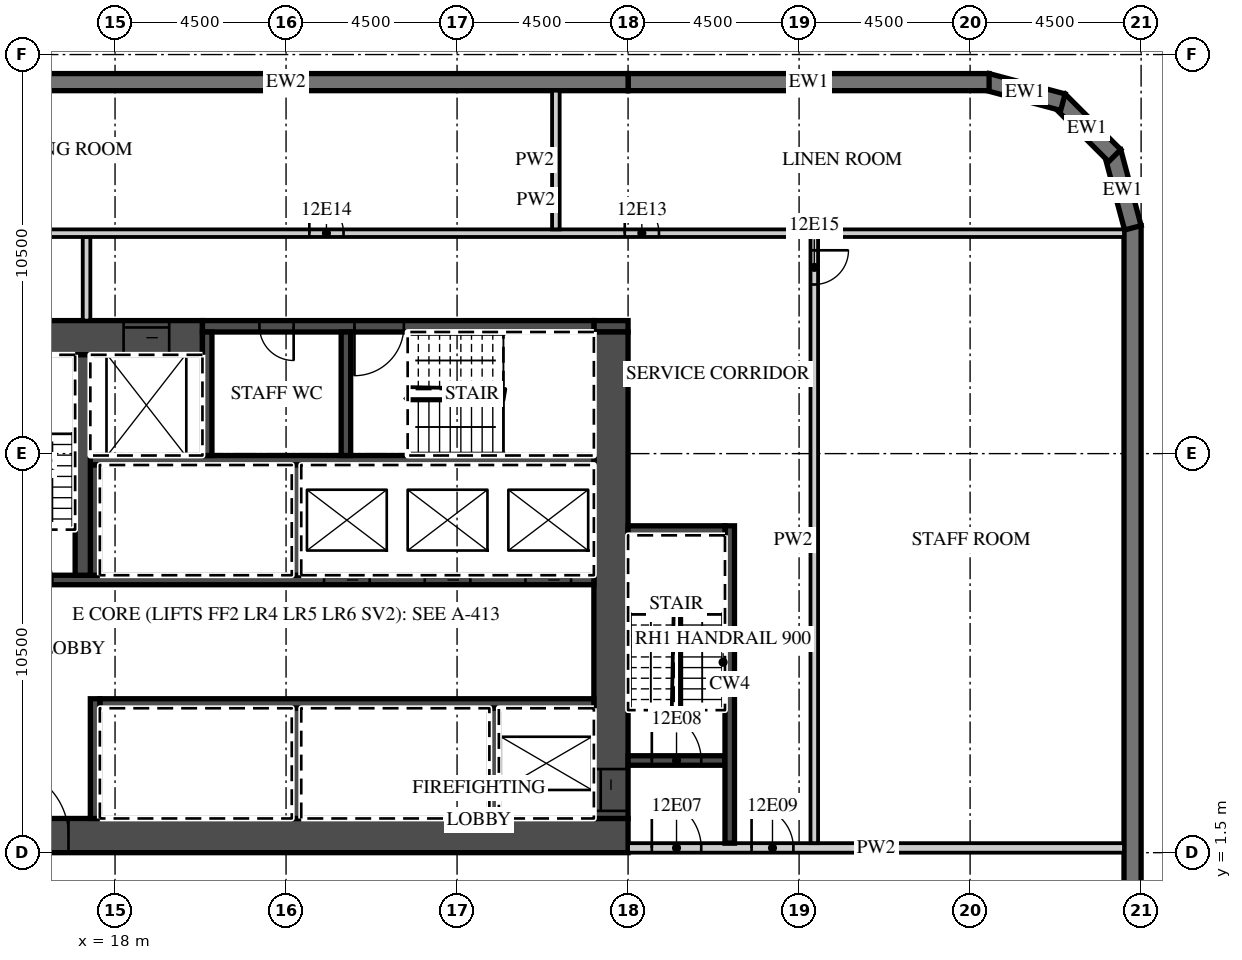
"""IFC4 building model, lengths in metres.
Left out: names, types, materials, properties, quantities, classifications, styles, units other than length and angle.
Written with IfcOpenShell. Run it as: python <this file> out.ifc"""

import sys

from ifc_helpers import new_model, si_unit, direction, frame, frame_2d, origin, place, context, subcontext, project, spatial, polyline, rectangle, outline, extrude, element, fill, save


model = new_model("IFC4")
c1 = context("Model", 3, precision=1e-05, world=origin(), true_north=direction((0.0, 1.0)))
c2 = subcontext(c1, "Body", "Model", "MODEL_VIEW")
j1 = project(units=[si_unit("LENGTHUNIT", "METRE"), si_unit("PLANEANGLEUNIT", "RADIAN")], contexts=[c1])
p1 = place(None, origin())
s1 = spatial("IfcSite", under=j1, at=p1, CompositionType="ELEMENT")
p2 = place(p1, origin())
s2 = spatial("IfcBuilding", under=s1, at=p2, CompositionType="ELEMENT")
p3 = place(p2, frame((0.0, 0.0, 69.9)))
s3 = spatial("IfcBuildingStorey", under=s2, at=p3, CompositionType="ELEMENT", Elevation=69.9)
p4 = place(p3, frame((44.775, -18.0, 0.0), z_axis=(0.0, 0.0, 1.0), x_axis=(0.0, 1.0, 0.0)))
e1 = element("IfcWall", 1, at=p4, inside=s3, PredefinedType="SOLIDWALL", context=c2, shape_type="SweptSolid", body=[
    extrude(rectangle(XDim=36.0, YDim=0.45, at=frame_2d((18.0, 0.0))), origin(), (0.0, 0.0, 1.0), 3.02),
])
p5 = place(p4, frame((3.9, 0.0, 0.45)))
e2 = element("IfcOpeningElement", 2, at=p5, cuts=e1, PredefinedType="OPENING", context=c2, shape_type="SweptSolid", body=[
    extrude(rectangle(XDim=3.3, YDim=2.25, at=frame_2d((1.65, 1.125))), frame((0.0, 0.235, 0.0), z_axis=(0.0, -1.0, 0.0), x_axis=(1.0, 0.0, 0.0)), (0.0, 0.0, 1.0), 0.47),
])
p6 = place(p4, frame((8.4, 0.0, 0.45)))
e3 = element("IfcOpeningElement", 3, at=p6, cuts=e1, PredefinedType="OPENING", context=c2, shape_type="SweptSolid", body=[
    extrude(rectangle(XDim=3.3, YDim=2.25, at=frame_2d((1.65, 1.125))), frame((0.0, 0.235, 0.0), z_axis=(0.0, -1.0, 0.0), x_axis=(1.0, 0.0, 0.0)), (0.0, 0.0, 1.0), 0.47),
])
p7 = place(p4, frame((12.9, 0.0, 0.45)))
e4 = element("IfcOpeningElement", 4, at=p7, cuts=e1, PredefinedType="OPENING", context=c2, shape_type="SweptSolid", body=[
    extrude(rectangle(XDim=3.3, YDim=2.25, at=frame_2d((1.65, 1.125))), frame((0.0, 0.235, 0.0), z_axis=(0.0, -1.0, 0.0), x_axis=(1.0, 0.0, 0.0)), (0.0, 0.0, 1.0), 0.47),
])
p8 = place(p3, frame((44.783, 17.942, 0.0), z_axis=(0.0, 0.0, 1.0), x_axis=(-0.25881466832, 0.965926999034, 0.0)))
e5 = element("IfcWall", 5, at=p8, inside=s3, PredefinedType="SOLIDWALL", context=c2, shape_type="SweptSolid", body=[
    extrude(outline(polyline([(0.0, -0.225), (2.071, -0.225), (1.95, 0.225), (0.121, 0.225), (0.0, -0.225)])), origin(), (0.0, 0.0, 1.0), 3.02),
])
p9 = place(p3, frame((44.305, 19.841, 0.0), z_axis=(0.0, 0.0, 1.0), x_axis=(-0.707106781187, 0.707106781187, 0.0)))
e6 = element("IfcWall", 6, at=p9, inside=s3, PredefinedType="SOLIDWALL", context=c2, shape_type="SweptSolid", body=[
    extrude(outline(polyline([(0.0, -0.225), (2.071, -0.225), (1.95, 0.225), (0.121, 0.225), (0.0, -0.225)])), origin(), (0.0, 0.0, 1.0), 3.02),
])
p10 = place(p3, frame((42.942, 21.247, 0.0), z_axis=(0.0, 0.0, 1.0), x_axis=(-0.965926999034, 0.25881466832, 0.0)))
e7 = element("IfcWall", 7, at=p10, inside=s3, PredefinedType="SOLIDWALL", context=c2, shape_type="SweptSolid", body=[
    extrude(outline(polyline([(-0.0, -0.225), (2.07, -0.225), (1.95, 0.225), (0.12, 0.225), (-0.0, -0.225)])), origin(), (0.0, 0.0, 1.0), 3.02),
])
p11 = place(p3, frame((41.0, 21.775, 0.0), z_axis=(0.0, 0.0, 1.0), x_axis=(-1.0, 0.0, 0.0)))
e8 = element("IfcWall", 8, at=p11, inside=s3, PredefinedType="SOLIDWALL", context=c2, shape_type="SweptSolid", body=[
    extrude(rectangle(XDim=9.5, YDim=0.45, at=frame_2d((4.75, 0.0))), origin(), (0.0, 0.0, 1.0), 3.02),
])
p12 = place(p3, frame((31.5, 21.775, 0.0), z_axis=(0.0, 0.0, 1.0), x_axis=(-1.0, 0.0, 0.0)))
e9 = element("IfcWall", 9, at=p12, inside=s3, PredefinedType="SOLIDWALL", context=c2, shape_type="SweptSolid", body=[
    extrude(rectangle(XDim=18.0, YDim=0.45, at=frame_2d((9.0, 0.0))), origin(), (0.0, 0.0, 1.0), 3.02),
])
p13 = place(p3, frame((13.5, 1.95, 0.0), z_axis=(0.0, 0.0, 1.0), x_axis=(1.0, 0.0, 0.0)))
e10 = element("IfcWall", 10, at=p13, inside=s3, PredefinedType="SHEAR", context=c2, shape_type="SweptSolid", body=[
    extrude(rectangle(XDim=18.0, YDim=0.9, at=frame_2d((9.0, 0.0))), origin(), (0.0, 0.0, 1.0), 3.02),
])
p14 = place(p13, frame((1.475, 0.0, 0.0)))
e11 = element("IfcOpeningElement", 11, at=p14, cuts=e10, PredefinedType="OPENING", context=c2, shape_type="SweptSolid", body=[
    extrude(rectangle(XDim=1.8, YDim=2.1, at=frame_2d((0.9, 1.05))), frame((0.0, 0.46, 0.0), z_axis=(0.0, -1.0, 0.0), x_axis=(1.0, 0.0, 0.0)), (0.0, 0.0, 1.0), 0.92),
])
p15 = place(p3, frame((13.5, 15.05, 0.0), z_axis=(0.0, 0.0, 1.0), x_axis=(1.0, 0.0, 0.0)))
e12 = element("IfcWall", 12, at=p15, inside=s3, PredefinedType="SHEAR", context=c2, shape_type="SweptSolid", body=[
    extrude(rectangle(XDim=6.8, YDim=0.9, at=frame_2d((3.4, 0.0))), origin(), (0.0, 0.0, 1.0), 3.02),
])
p16 = place(p15, frame((4.725, 0.0, 0.0)))
e13 = element("IfcOpeningElement", 13, at=p16, cuts=e12, PredefinedType="OPENING", context=c2, shape_type="SweptSolid", body=[
    extrude(rectangle(XDim=1.2, YDim=2.1, at=frame_2d((0.6, 1.05))), frame((0.0, 0.46, 0.0), z_axis=(0.0, -1.0, 0.0), x_axis=(1.0, 0.0, 0.0)), (0.0, 0.0, 1.0), 0.92),
])
p17 = place(p3, frame((30.6, 15.35, 0.0), z_axis=(0.0, 0.0, 1.0), x_axis=(1.0, 0.0, 0.0)))
e14 = element("IfcWall", 14, at=p17, inside=s3, PredefinedType="SHEAR", context=c2, shape_type="SweptSolid", body=[
    extrude(rectangle(XDim=0.9, YDim=0.3, at=frame_2d((0.45, 0.0))), origin(), (0.0, 0.0, 1.0), 3.02),
])
p18 = place(p3, frame((20.3, 15.35, 0.0), z_axis=(0.0, 0.0, 1.0), x_axis=(1.0, 0.0, 0.0)))
e15 = element("IfcWall", 15, at=p18, inside=s3, PredefinedType="SHEAR", context=c2, shape_type="SweptSolid", body=[
    extrude(rectangle(XDim=10.3, YDim=0.3, at=frame_2d((5.15, 0.0))), origin(), (0.0, 0.0, 1.0), 3.02),
])
p19 = place(p18, frame((4.0, 0.0, 0.0)))
e16 = element("IfcOpeningElement", 16, at=p19, cuts=e15, PredefinedType="OPENING", context=c2, shape_type="SweptSolid", body=[
    extrude(rectangle(XDim=1.3, YDim=2.1, at=frame_2d((0.65, 1.05))), frame((0.0, 0.16, 0.0), z_axis=(0.0, -1.0, 0.0), x_axis=(1.0, 0.0, 0.0)), (0.0, 0.0, 1.0), 0.32),
])
p20 = place(p18, frame((1.5, 0.0, 0.0)))
e17 = element("IfcOpeningElement", 17, at=p20, cuts=e15, PredefinedType="OPENING", context=c2, shape_type="SweptSolid", body=[
    extrude(rectangle(XDim=0.9, YDim=2.1, at=frame_2d((0.45, 1.05))), frame((0.0, 0.16, 0.0), z_axis=(0.0, -1.0, 0.0), x_axis=(1.0, 0.0, 0.0)), (0.0, 0.0, 1.0), 0.32),
])
p21 = place(p3, frame((31.05, 2.4, 0.0), z_axis=(0.0, 0.0, 1.0), x_axis=(0.0, 1.0, 0.0)))
e18 = element("IfcWall", 18, at=p21, inside=s3, PredefinedType="SHEAR", context=c2, shape_type="SweptSolid", body=[
    extrude(rectangle(XDim=12.8, YDim=0.9, at=frame_2d((6.4, 0.0))), origin(), (0.0, 0.0, 1.0), 3.02),
])
p22 = place(p21, frame((0.2, 0.0, 0.0)))
e19 = element("IfcOpeningElement", 19, at=p22, cuts=e18, PredefinedType="OPENING", context=c2, shape_type="SweptSolid", body=[
    extrude(rectangle(XDim=1.1, YDim=2.1, at=frame_2d((0.55, 1.05))), frame((0.0, 0.46, 0.0), z_axis=(0.0, -1.0, 0.0), x_axis=(1.0, 0.0, 0.0)), (0.0, 0.0, 1.0), 0.92),
])
p23 = place(p3, frame((17.6, 5.425, 0.0), z_axis=(0.0, 0.0, 1.0), x_axis=(1.0, 0.0, 0.0)))
e20 = element("IfcWall", 20, at=p23, inside=s3, PredefinedType="SHEAR", context=c2, shape_type="SweptSolid", body=[
    extrude(rectangle(XDim=13.0, YDim=0.25, at=frame_2d((6.5, 0.0))), origin(), (0.0, 0.0, 1.0), 3.02),
])
p24 = place(p3, frame((17.475, 2.4, 0.0), z_axis=(0.0, 0.0, 1.0), x_axis=(0.0, 1.0, 0.0)))
e21 = element("IfcWall", 21, at=p24, inside=s3, PredefinedType="SHEAR", context=c2, shape_type="SweptSolid", body=[
    extrude(rectangle(XDim=3.15, YDim=0.25, at=frame_2d((1.575, 0.0))), origin(), (0.0, 0.0, 1.0), 3.02),
])
for number, where, z_axis, x_axis in (
    (22, (27.975, 2.4, 0.0), (0.0, 0.0, 1.0), (0.0, 1.0, 0.0)),
    (23, (22.775, 2.4, 0.0), (0.0, 0.0, 1.0), (0.0, 1.0, 0.0)),
):
    element("IfcWall", number, at=place(p3, frame(where, z_axis=z_axis, x_axis=x_axis)), inside=s3, PredefinedType="SHEAR", context=c2, shape_type="SweptSolid", body=[
        extrude(rectangle(XDim=2.9, YDim=0.25, at=frame_2d((1.45, 0.0))), origin(), (0.0, 0.0, 1.0), 3.02),
    ])
p25 = place(p3, frame((14.4, 8.675, 0.0), z_axis=(0.0, 0.0, 1.0), x_axis=(1.0, 0.0, 0.0)))
e24 = element("IfcWall", 24, at=p25, inside=s3, PredefinedType="SHEAR", context=c2, shape_type="SweptSolid", body=[
    extrude(rectangle(XDim=16.2, YDim=0.25, at=frame_2d((8.1, 0.0))), origin(), (0.0, 0.0, 1.0), 3.02),
])
p26 = place(p25, frame((14.4, 0.0, 0.0)))
e25 = element("IfcOpeningElement", 25, at=p26, cuts=e24, PredefinedType="OPENING", context=c2, shape_type="SweptSolid", body=[
    extrude(rectangle(XDim=1.2, YDim=2.1, at=frame_2d((0.6, 1.05))), frame((0.0, 0.135, 0.0), z_axis=(0.0, -1.0, 0.0), x_axis=(1.0, 0.0, 0.0)), (0.0, 0.0, 1.0), 0.27),
])
p27 = place(p25, frame((11.75, 0.0, 0.0)))
e26 = element("IfcOpeningElement", 26, at=p27, cuts=e24, PredefinedType="OPENING", context=c2, shape_type="SweptSolid", body=[
    extrude(rectangle(XDim=1.2, YDim=2.1, at=frame_2d((0.6, 1.05))), frame((0.0, 0.135, 0.0), z_axis=(0.0, -1.0, 0.0), x_axis=(1.0, 0.0, 0.0)), (0.0, 0.0, 1.0), 0.27),
])
p28 = place(p25, frame((9.1, 0.0, 0.0)))
e27 = element("IfcOpeningElement", 27, at=p28, cuts=e24, PredefinedType="OPENING", context=c2, shape_type="SweptSolid", body=[
    extrude(rectangle(XDim=1.2, YDim=2.1, at=frame_2d((0.6, 1.05))), frame((0.0, 0.135, 0.0), z_axis=(0.0, -1.0, 0.0), x_axis=(1.0, 0.0, 0.0)), (0.0, 0.0, 1.0), 0.27),
])
p29 = place(p25, frame((0.65, 0.0, 0.0)))
e28 = element("IfcOpeningElement", 28, at=p29, cuts=e24, PredefinedType="OPENING", context=c2, shape_type="SweptSolid", body=[
    extrude(rectangle(XDim=1.3, YDim=2.1, at=frame_2d((0.65, 1.05))), frame((0.0, 0.135, 0.0), z_axis=(0.0, -1.0, 0.0), x_axis=(1.0, 0.0, 0.0)), (0.0, 0.0, 1.0), 0.27),
])
p30 = place(p3, frame((17.35, 11.825, 0.0), z_axis=(0.0, 0.0, 1.0), x_axis=(1.0, 0.0, 0.0)))
e29 = element("IfcWall", 29, at=p30, inside=s3, PredefinedType="SHEAR", context=c2, shape_type="SweptSolid", body=[
    extrude(rectangle(XDim=13.25, YDim=0.25, at=frame_2d((6.625, 0.0))), origin(), (0.0, 0.0, 1.0), 3.02),
])
for number, where, z_axis, x_axis in (
    (30, (17.475, 8.8, 0.0), (0.0, 0.0, 1.0), (0.0, 1.0, 0.0)),
    (31, (22.775, 8.8, 0.0), (0.0, 0.0, 1.0), (0.0, 1.0, 0.0)),
):
    element("IfcWall", number, at=place(p3, frame(where, z_axis=z_axis, x_axis=x_axis)), inside=s3, PredefinedType="SHEAR", context=c2, shape_type="SweptSolid", body=[
        extrude(rectangle(XDim=2.9, YDim=0.25, at=frame_2d((1.45, 0.0))), origin(), (0.0, 0.0, 1.0), 3.02),
    ])
p31 = place(p3, frame((17.15, 8.8, 0.0), z_axis=(0.0, 0.0, 1.0), x_axis=(0.0, 1.0, 0.0)))
e32 = element("IfcWall", 32, at=p31, inside=s3, PredefinedType="SHEAR", context=c2, shape_type="SweptSolid", body=[
    extrude(rectangle(XDim=5.8, YDim=0.4, at=frame_2d((2.9, 0.0))), origin(), (0.0, 0.0, 1.0), 3.02),
])
for number, where, z_axis, x_axis in (
    (33, (20.425, 11.95, 0.0), (0.0, 0.0, 1.0), (0.0, 1.0, 0.0)),
    (34, (24.075, 11.95, 0.0), (0.0, 0.0, 1.0), (0.0, 1.0, 0.0)),
):
    element("IfcWall", number, at=place(p3, frame(where, z_axis=z_axis, x_axis=x_axis)), inside=s3, PredefinedType="SHEAR", context=c2, shape_type="SweptSolid", body=[
        extrude(rectangle(XDim=3.25, YDim=0.25, at=frame_2d((1.625, 0.0))), origin(), (0.0, 0.0, 1.0), 3.02),
    ])
p32 = place(p3, frame((31.5, 1.625, 0.0), z_axis=(0.0, 0.0, 1.0), x_axis=(1.0, 0.0, 0.0)))
e35 = element("IfcWall", 35, at=p32, inside=s3, PredefinedType="PARTITIONING", context=c2, shape_type="SweptSolid", body=[
    extrude(rectangle(XDim=13.05, YDim=0.25, at=frame_2d((6.525, 0.0))), origin(), (0.0, 0.0, 1.0), 3.02),
])
p33 = place(p32, frame((0.625, 0.0, 0.0)))
e36 = element("IfcOpeningElement", 36, at=p33, cuts=e35, PredefinedType="OPENING", context=c2, shape_type="SweptSolid", body=[
    extrude(rectangle(XDim=1.3, YDim=2.1, at=frame_2d((0.65, 1.05))), frame((0.0, 0.135, 0.0), z_axis=(0.0, -1.0, 0.0), x_axis=(1.0, 0.0, 0.0)), (0.0, 0.0, 1.0), 0.27),
])
p34 = place(p32, frame((3.25, 0.0, 0.0)))
e37 = element("IfcOpeningElement", 37, at=p34, cuts=e35, PredefinedType="OPENING", context=c2, shape_type="SweptSolid", body=[
    extrude(rectangle(XDim=1.1, YDim=2.1, at=frame_2d((0.55, 1.05))), frame((0.0, 0.135, 0.0), z_axis=(0.0, -1.0, 0.0), x_axis=(1.0, 0.0, 0.0)), (0.0, 0.0, 1.0), 0.27),
])
p35 = place(p3, frame((31.5, 3.925, 0.0), z_axis=(0.0, 0.0, 1.0), x_axis=(1.0, 0.0, 0.0)))
e38 = element("IfcWall", 38, at=p35, inside=s3, PredefinedType="SHEAR", context=c2, shape_type="SweptSolid", body=[
    extrude(rectangle(XDim=2.55, YDim=0.25, at=frame_2d((1.275, 0.0))), origin(), (0.0, 0.0, 1.0), 3.02),
])
p36 = place(p35, frame((0.625, 0.0, 0.0)))
e39 = element("IfcOpeningElement", 39, at=p36, cuts=e38, PredefinedType="OPENING", context=c2, shape_type="SweptSolid", body=[
    extrude(rectangle(XDim=1.3, YDim=2.1, at=frame_2d((0.65, 1.05))), frame((0.0, 0.135, 0.0), z_axis=(0.0, -1.0, 0.0), x_axis=(1.0, 0.0, 0.0)), (0.0, 0.0, 1.0), 0.27),
])
p37 = place(p3, frame((34.175, 1.75, 0.0), z_axis=(0.0, 0.0, 1.0), x_axis=(0.0, 1.0, 0.0)))
e40 = element("IfcWall", 40, at=p37, inside=s3, PredefinedType="SHEAR", context=c2, shape_type="SweptSolid", body=[
    extrude(rectangle(XDim=8.35, YDim=0.25, at=frame_2d((4.175, 0.0))), origin(), (0.0, 0.0, 1.0), 3.02),
])
p38 = place(p3, frame((31.5, 9.975, 0.0), z_axis=(0.0, 0.0, 1.0), x_axis=(1.0, 0.0, 0.0)))
e41 = element("IfcWall", 41, at=p38, inside=s3, PredefinedType="SHEAR", context=c2, shape_type="SweptSolid", body=[
    extrude(rectangle(XDim=2.55, YDim=0.25, at=frame_2d((1.275, 0.0))), origin(), (0.0, 0.0, 1.0), 3.02),
])
p39 = place(p3, frame((17.25, 15.5, 0.0), z_axis=(0.0, 0.0, 1.0), x_axis=(0.0, 1.0, 0.0)))
e42 = element("IfcWall", 42, at=p39, inside=s3, PredefinedType="PARTITIONING", context=c2, shape_type="SweptSolid", body=[
    extrude(rectangle(XDim=2.2, YDim=0.2, at=frame_2d((1.1, 0.0))), origin(), (0.0, 0.0, 1.0), 3.02),
])
p40 = place(p3, frame((36.4, 1.75, 0.0), z_axis=(0.0, 0.0, 1.0), x_axis=(0.0, 1.0, 0.0)))
e43 = element("IfcWall", 43, at=p40, inside=s3, PredefinedType="PARTITIONING", context=c2, shape_type="SweptSolid", body=[
    extrude(rectangle(XDim=15.95, YDim=0.2, at=frame_2d((7.975, 0.0))), origin(), (0.0, 0.0, 1.0), 3.02),
])
p41 = place(p40, frame((14.7, 0.0, 0.0)))
e44 = element("IfcOpeningElement", 44, at=p41, cuts=e43, PredefinedType="OPENING", context=c2, shape_type="SweptSolid", body=[
    extrude(rectangle(XDim=0.9, YDim=2.1, at=frame_2d((0.45, 1.05))), frame((0.0, 0.11, 0.0), z_axis=(0.0, -1.0, 0.0), x_axis=(1.0, 0.0, 0.0)), (0.0, 0.0, 1.0), 0.22),
])
p42 = place(p3, frame((13.6, 17.8, 0.0), z_axis=(0.0, 0.0, 1.0), x_axis=(1.0, 0.0, 0.0)))
e45 = element("IfcWall", 45, at=p42, inside=s3, PredefinedType="PARTITIONING", context=c2, shape_type="SweptSolid", body=[
    extrude(rectangle(XDim=30.95, YDim=0.2, at=frame_2d((15.475, 0.0))), origin(), (0.0, 0.0, 1.0), 3.02),
])
p43 = place(p42, frame((17.812, 0.0, 0.0)))
e46 = element("IfcOpeningElement", 46, at=p43, cuts=e45, PredefinedType="OPENING", context=c2, shape_type="SweptSolid", body=[
    extrude(rectangle(XDim=0.9, YDim=2.1, at=frame_2d((0.45, 1.05))), frame((0.0, 0.11, 0.0), z_axis=(0.0, -1.0, 0.0), x_axis=(1.0, 0.0, 0.0)), (0.0, 0.0, 1.0), 0.22),
])
p44 = place(p42, frame((9.512, 0.0, 0.0)))
e47 = element("IfcOpeningElement", 47, at=p44, cuts=e45, PredefinedType="OPENING", context=c2, shape_type="SweptSolid", body=[
    extrude(rectangle(XDim=0.9, YDim=2.1, at=frame_2d((0.45, 1.05))), frame((0.0, 0.11, 0.0), z_axis=(0.0, -1.0, 0.0), x_axis=(1.0, 0.0, 0.0)), (0.0, 0.0, 1.0), 0.22),
])
p45 = place(p3, frame((29.6, 17.9, 0.0), z_axis=(0.0, 0.0, 1.0), x_axis=(0.0, 1.0, 0.0)))
e48 = element("IfcWall", 48, at=p45, inside=s3, PredefinedType="PARTITIONING", context=c2, shape_type="SweptSolid", body=[
    extrude(rectangle(XDim=3.65, YDim=0.2, at=frame_2d((1.825, 0.0))), origin(), (0.0, 0.0, 1.0), 3.02),
])
p46 = place(p26, origin())
e49 = element("IfcDoor", 49, at=p46, inside=s3, OperationType="SLIDING_TO_LEFT", PredefinedType="DOOR", context=c2, shape_type="SweptSolid", body=[
    extrude(rectangle(XDim=1.2, YDim=2.1, at=frame_2d((0.6, 1.05))), frame((0.0, 0.025, 0.0), z_axis=(0.0, -1.0, 0.0), x_axis=(1.0, 0.0, 0.0)), (0.0, 0.0, 1.0), 0.05),
])
fill(e25, e49)
p47 = place(p27, origin())
e50 = element("IfcDoor", 50, at=p47, inside=s3, OperationType="SLIDING_TO_RIGHT", PredefinedType="DOOR", context=c2, shape_type="SweptSolid", body=[
    extrude(rectangle(XDim=1.2, YDim=2.1, at=frame_2d((0.6, 1.05))), frame((0.0, 0.025, 0.0), z_axis=(0.0, -1.0, 0.0), x_axis=(1.0, 0.0, 0.0)), (0.0, 0.0, 1.0), 0.05),
])
fill(e26, e50)
p48 = place(p28, origin())
e51 = element("IfcDoor", 51, at=p48, inside=s3, OperationType="SLIDING_TO_RIGHT", PredefinedType="DOOR", context=c2, shape_type="SweptSolid", body=[
    extrude(rectangle(XDim=1.2, YDim=2.1, at=frame_2d((0.6, 1.05))), frame((0.0, 0.025, 0.0), z_axis=(0.0, -1.0, 0.0), x_axis=(1.0, 0.0, 0.0)), (0.0, 0.0, 1.0), 0.05),
])
fill(e27, e51)
p49 = place(p16, origin())
e52 = element("IfcDoor", 52, at=p49, inside=s3, OperationType="SLIDING_TO_LEFT", PredefinedType="DOOR", context=c2, shape_type="SweptSolid", body=[
    extrude(rectangle(XDim=1.2, YDim=2.1, at=frame_2d((0.6, 1.05))), frame((0.0, 0.025, 0.0), z_axis=(0.0, -1.0, 0.0), x_axis=(1.0, 0.0, 0.0)), (0.0, 0.0, 1.0), 0.05),
])
fill(e13, e52)
p50 = place(p22, origin())
e53 = element("IfcDoor", 53, at=p50, inside=s3, OperationType="SLIDING_TO_LEFT", PredefinedType="DOOR", context=c2, shape_type="SweptSolid", body=[
    extrude(rectangle(XDim=1.1, YDim=2.1, at=frame_2d((0.55, 1.05))), frame((0.0, 0.025, 0.0), z_axis=(0.0, -1.0, 0.0), x_axis=(1.0, 0.0, 0.0)), (0.0, 0.0, 1.0), 0.05),
])
fill(e19, e53)
p51 = place(p14, origin())
e54 = element("IfcDoor", 54, at=p51, inside=s3, OperationType="DOUBLE_DOOR_DOUBLE_SWING", PredefinedType="DOOR", context=c2, shape_type="SweptSolid", body=[
    extrude(rectangle(XDim=1.8, YDim=2.1, at=frame_2d((0.9, 1.05))), frame((0.0, 0.025, 0.0), z_axis=(0.0, -1.0, 0.0), x_axis=(1.0, 0.0, 0.0)), (0.0, 0.0, 1.0), 0.05),
])
fill(e11, e54)
p52 = place(p33, origin())
e55 = element("IfcDoor", 55, at=p52, inside=s3, OperationType="SINGLE_SWING_LEFT", PredefinedType="DOOR", context=c2, shape_type="SweptSolid", body=[
    extrude(rectangle(XDim=1.3, YDim=2.1, at=frame_2d((0.65, 1.05))), frame((0.0, 0.025, 0.0), z_axis=(0.0, -1.0, 0.0), x_axis=(1.0, 0.0, 0.0)), (0.0, 0.0, 1.0), 0.05),
])
fill(e36, e55)
p53 = place(p36, origin())
e56 = element("IfcDoor", 56, at=p53, inside=s3, OperationType="SINGLE_SWING_LEFT", PredefinedType="DOOR", context=c2, shape_type="SweptSolid", body=[
    extrude(rectangle(XDim=1.3, YDim=2.1, at=frame_2d((0.65, 1.05))), frame((0.0, 0.025, 0.0), z_axis=(0.0, -1.0, 0.0), x_axis=(1.0, 0.0, 0.0)), (0.0, 0.0, 1.0), 0.05),
])
fill(e39, e56)
p54 = place(p34, origin())
e57 = element("IfcDoor", 57, at=p54, inside=s3, OperationType="SINGLE_SWING_LEFT", PredefinedType="DOOR", context=c2, shape_type="SweptSolid", body=[
    extrude(rectangle(XDim=1.1, YDim=2.1, at=frame_2d((0.55, 1.05))), frame((0.0, 0.025, 0.0), z_axis=(0.0, -1.0, 0.0), x_axis=(1.0, 0.0, 0.0)), (0.0, 0.0, 1.0), 0.05),
])
fill(e37, e57)
p55 = place(p19, origin())
e58 = element("IfcDoor", 58, at=p55, inside=s3, OperationType="SINGLE_SWING_LEFT", PredefinedType="DOOR", context=c2, shape_type="SweptSolid", body=[
    extrude(rectangle(XDim=1.3, YDim=2.1, at=frame_2d((0.65, 1.05))), frame((0.0, 0.025, 0.0), z_axis=(0.0, -1.0, 0.0), x_axis=(1.0, 0.0, 0.0)), (0.0, 0.0, 1.0), 0.05),
])
fill(e16, e58)
p56 = place(p20, origin())
e59 = element("IfcDoor", 59, at=p56, inside=s3, OperationType="SINGLE_SWING_RIGHT", PredefinedType="DOOR", context=c2, shape_type="SweptSolid", body=[
    extrude(rectangle(XDim=0.9, YDim=2.1, at=frame_2d((0.45, 1.05))), frame((0.0, 0.025, 0.0), z_axis=(0.0, -1.0, 0.0), x_axis=(1.0, 0.0, 0.0)), (0.0, 0.0, 1.0), 0.05),
])
fill(e17, e59)
p57 = place(p43, origin())
e60 = element("IfcDoor", 60, at=p57, inside=s3, OperationType="SINGLE_SWING_LEFT", PredefinedType="DOOR", context=c2, shape_type="SweptSolid", body=[
    extrude(rectangle(XDim=0.9, YDim=2.1, at=frame_2d((0.45, 1.05))), frame((0.0, 0.025, 0.0), z_axis=(0.0, -1.0, 0.0), x_axis=(1.0, 0.0, 0.0)), (0.0, 0.0, 1.0), 0.05),
])
fill(e46, e60)
p58 = place(p44, origin())
e61 = element("IfcDoor", 61, at=p58, inside=s3, OperationType="SINGLE_SWING_LEFT", PredefinedType="DOOR", context=c2, shape_type="SweptSolid", body=[
    extrude(rectangle(XDim=0.9, YDim=2.1, at=frame_2d((0.45, 1.05))), frame((0.0, 0.025, 0.0), z_axis=(0.0, -1.0, 0.0), x_axis=(1.0, 0.0, 0.0)), (0.0, 0.0, 1.0), 0.05),
])
fill(e47, e61)
p59 = place(p41, origin())
e62 = element("IfcDoor", 62, at=p59, inside=s3, OperationType="SINGLE_SWING_RIGHT", PredefinedType="DOOR", context=c2, shape_type="SweptSolid", body=[
    extrude(rectangle(XDim=0.9, YDim=2.1, at=frame_2d((0.45, 1.05))), frame((0.0, 0.025, 0.0), z_axis=(0.0, -1.0, 0.0), x_axis=(1.0, 0.0, 0.0)), (0.0, 0.0, 1.0), 0.05),
])
fill(e44, e62)
save(model, sys.argv[1])
